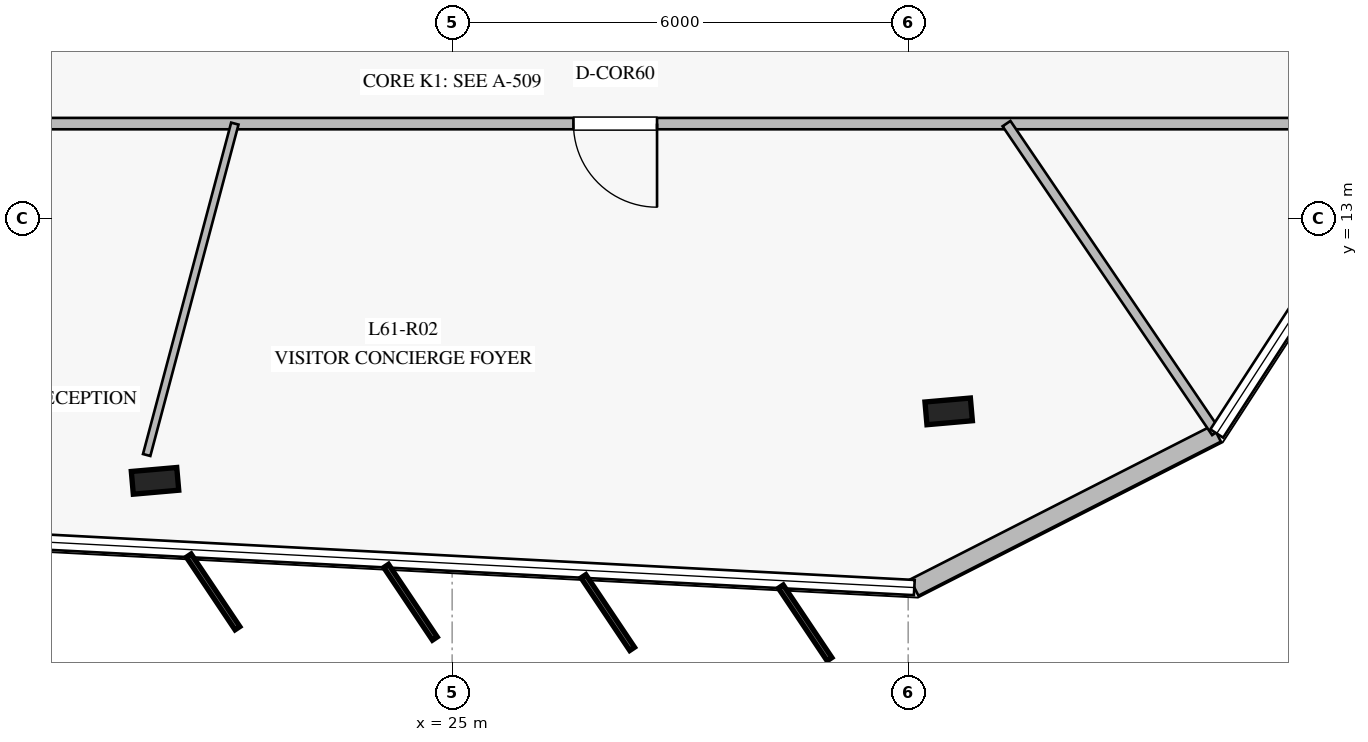
"""IFC4 building model, lengths in metres.
Left out: names, types, materials, properties, quantities, classifications, styles, units other than length and angle.
Written with IfcOpenShell. Run it as: python <this file> out.ifc"""

import sys

from ifc_helpers import new_model, si_unit, direction, frame, frame_2d, origin, origin_2d, place, context, subcontext, project, spatial, rectangle, i_section, extrude, element, fill, save


model = new_model("IFC4")
c1 = context("Model", 3, precision=1e-05, world=origin(), true_north=direction((0.0, 1.0)))
c2 = subcontext(c1, "Body", "Model", "MODEL_VIEW")
j1 = project(units=[si_unit("LENGTHUNIT", "METRE"), si_unit("PLANEANGLEUNIT", "RADIAN")], contexts=[c1])
p1 = place(None, origin())
s1 = spatial("IfcSite", under=j1, at=p1, CompositionType="ELEMENT")
p2 = place(p1, origin())
s2 = spatial("IfcBuilding", under=s1, at=p2, CompositionType="ELEMENT")
p3 = place(p2, frame((0.0, 0.0, 254.2)))
s3 = spatial("IfcBuildingStorey", under=s2, at=p3, CompositionType="ELEMENT", Elevation=254.2)
for number, where, z_axis, x_axis in (
    (1, (21.091, 9.55, 0.0), (0.0, 0.0, 1.0), (0.996, 0.087, 0.0)),
    (2, (31.533, 10.464, 0.0), (0.0, 0.0, 1.0), (0.996, 0.087, 0.0)),
):
    element("IfcColumn", number, at=place(p3, frame(where, z_axis=z_axis, x_axis=x_axis)), inside=s3, PredefinedType="COLUMN", context=c2, shape_type="SweptSolid", body=[
        extrude(i_section(OverallWidth=0.3, OverallDepth=0.6, WebThickness=0.015, FlangeThickness=0.03, at=origin_2d()), origin(), (0.0, 0.0, 1.0), 4.0),
    ])
p4 = place(p3, frame((31.081, 8.146, 0.0), z_axis=(0.0, 0.0, 1.0), x_axis=(0.891034072926, 0.453936428243, 0.0)))
e3 = element("IfcWall", 3, at=p4, inside=s3, PredefinedType="STANDARD", context=c2, shape_type="SweptSolid", body=[
    extrude(rectangle(XDim=4.466, YDim=0.24, at=frame_2d((2.233, 0.0))), origin(), (0.0, 0.0, 1.0), 3.78),
])
p5 = place(p3, frame((36.35, 14.25, 0.0), z_axis=(0.0, 0.0, 1.0), x_axis=(-1.0, 0.0, 0.0)))
e4 = element("IfcWall", 4, at=p5, inside=s3, PredefinedType="PARTITIONING", context=c2, shape_type="SweptSolid", body=[
    extrude(rectangle(XDim=22.7, YDim=0.15, at=frame_2d((11.35, 0.0))), origin(), (0.0, 0.0, 1.0), 3.28),
])
p6 = place(p5, frame((17.731, 0.0, 0.0)))
e5 = element("IfcOpeningElement", 5, at=p6, cuts=e4, PredefinedType="OPENING", context=c2, shape_type="SweptSolid", body=[
    extrude(rectangle(XDim=1.1, YDim=2.2, at=frame_2d((0.55, 1.1))), frame((0.0, 0.085, 0.0), z_axis=(0.0, -1.0, 0.0), x_axis=(1.0, 0.0, 0.0)), (0.0, 0.0, 1.0), 0.17),
])
p7 = place(p5, frame((8.654, 0.0, 0.0)))
e6 = element("IfcOpeningElement", 6, at=p7, cuts=e4, PredefinedType="OPENING", context=c2, shape_type="SweptSolid", body=[
    extrude(rectangle(XDim=1.1, YDim=2.2, at=frame_2d((0.55, 1.1))), frame((0.0, 0.085, 0.0), z_axis=(0.0, -1.0, 0.0), x_axis=(1.0, 0.0, 0.0)), (0.0, 0.0, 1.0), 0.17),
])
p8 = place(p3, frame((22.141, 14.25, 0.0), z_axis=(0.0, 0.0, 1.0), x_axis=(-0.257137215794, -0.966374902537, 0.0)))
e7 = element("IfcWall", 7, at=p8, inside=s3, PredefinedType="MOVABLE", context=c2, shape_type="SweptSolid", body=[
    extrude(rectangle(XDim=4.512, YDim=0.1, at=frame_2d((2.256, 0.0))), origin(), (0.0, 0.0, 1.0), 3.28),
])
p9 = place(p3, frame((32.294, 14.25, 0.0), z_axis=(0.0, 0.0, 1.0), x_axis=(0.561508713747, -0.827470823888, 0.0)))
e8 = element("IfcWall", 8, at=p9, inside=s3, PredefinedType="PARTITIONING", context=c2, shape_type="SweptSolid", body=[
    extrude(rectangle(XDim=4.91, YDim=0.125, at=frame_2d((2.455, 0.0))), origin(), (0.0, 0.0, 1.0), 3.28),
])
p10 = place(p7, origin())
e9 = element("IfcDoor", 9, at=p10, inside=s3, OperationType="SINGLE_SWING_LEFT", PredefinedType="DOOR", context=c2, shape_type="SweptSolid", body=[
    extrude(rectangle(XDim=1.1, YDim=2.2, at=frame_2d((0.55, 1.1))), frame((0.0, 0.025, 0.0), z_axis=(0.0, -1.0, 0.0), x_axis=(1.0, 0.0, 0.0)), (0.0, 0.0, 1.0), 0.05),
])
fill(e6, e9)
save(model, sys.argv[1])
